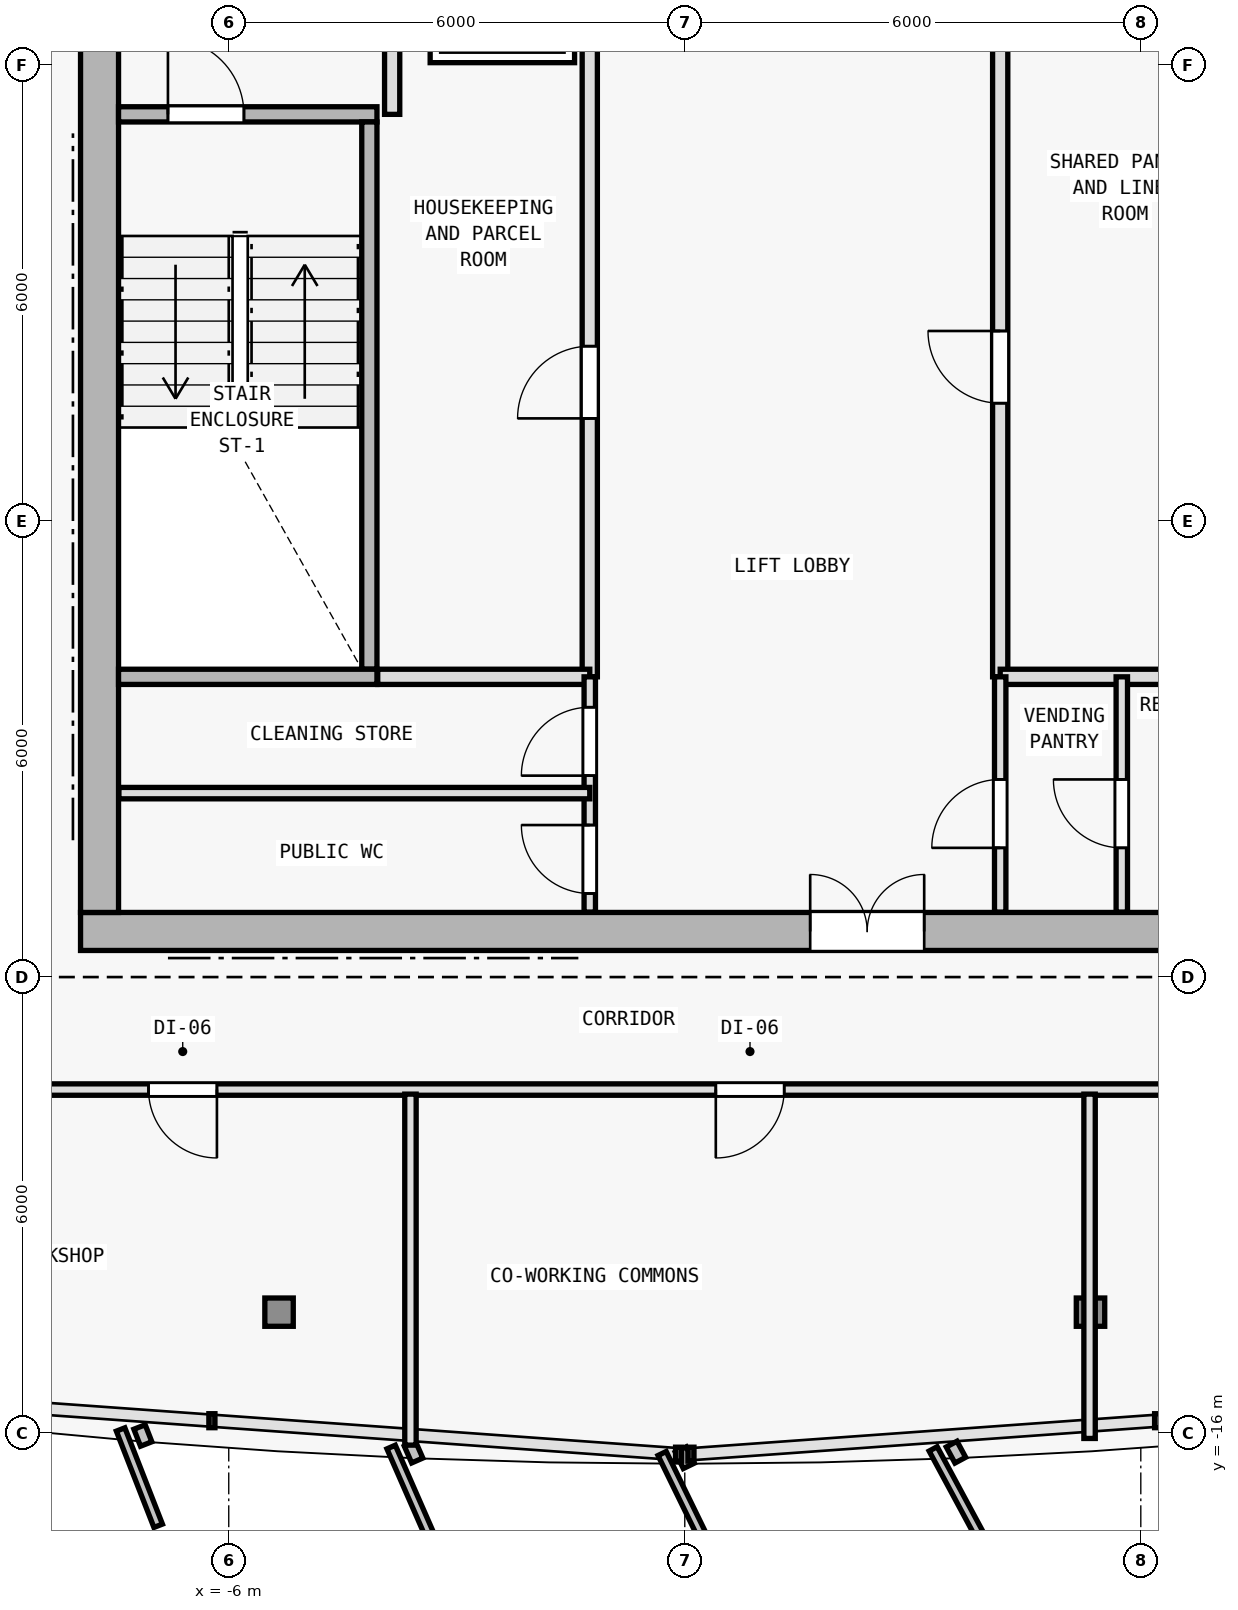
"""IFC4 building model, lengths in metres.
Left out: names, types, materials, properties, quantities, classifications, styles, units other than length and angle.
Written with IfcOpenShell. Run it as: python <this file> out.ifc"""

import sys

from ifc_helpers import new_model, si_unit, direction, frame, frame_2d, origin, origin_2d, place, context, subcontext, project, spatial, rectangle, i_section, extrude, element, fill, save


model = new_model("IFC4")
c1 = context("Model", 3, precision=1e-05, world=origin(), true_north=direction((0.0, 1.0)))
c2 = subcontext(c1, "Body", "Model", "MODEL_VIEW")
j1 = project(units=[si_unit("LENGTHUNIT", "METRE"), si_unit("PLANEANGLEUNIT", "RADIAN")], contexts=[c1])
p1 = place(None, origin())
s1 = spatial("IfcSite", under=j1, at=p1, CompositionType="ELEMENT")
p2 = place(p1, origin())
s2 = spatial("IfcBuilding", under=s1, at=p2, CompositionType="ELEMENT")
p3 = place(p2, frame((0.0, 0.0, 250.8)))
s3 = spatial("IfcBuildingStorey", under=s2, at=p3, CompositionType="ELEMENT", Elevation=250.8)
for number, where, z_axis, x_axis in (
    (1, (-7.7, -9.4, 0.0), (0.0, 0.0, 1.0), (1.0, 0.0, 0.0)),
    (2, (0.0, -9.4, 0.0), (0.0, 0.0, 1.0), (1.0, 0.0, 0.0)),
    (3, (-7.7, 2.0, 0.0), (0.0, 0.0, 1.0), (1.0, 0.0, 0.0)),
):
    element("IfcColumn", number, at=place(p3, frame(where, z_axis=z_axis, x_axis=x_axis)), inside=s3, PredefinedType="COLUMN", context=c2, shape_type="SweptSolid", body=[
        extrude(i_section(OverallWidth=0.374, OverallDepth=0.372, WebThickness=0.012, FlangeThickness=0.02, FilletRadius=0.015, at=origin_2d()), origin(), (0.0, 0.0, 1.0), 3.6),
    ])
for number, where, z_axis, x_axis in (
    (4, (-5.338, -14.408, 0.005), (0.007, 0.035, 0.999), (-0.982, 0.191, 0.0)),
    (5, (5.338, -14.408, 0.005), (-0.007, 0.035, 0.999), (-0.982, -0.191, 0.0)),
):
    element("IfcColumn", number, at=place(p3, frame(where, z_axis=z_axis, x_axis=x_axis)), inside=s3, PredefinedType="COLUMN", context=c2, shape_type="SweptSolid", body=[
        extrude(i_section(OverallWidth=0.374, OverallDepth=0.372, WebThickness=0.012, FlangeThickness=0.02, FilletRadius=0.015, at=origin_2d()), origin(), (0.0, 0.0, 1.0), 3.592),
    ])
p4 = place(p3, frame((-7.95, -9.4, 0.0), z_axis=(0.0, 0.0, 1.0), x_axis=(1.0, 0.0, 0.0)))
e6 = element("IfcWall", 6, at=p4, inside=s3, PredefinedType="SHEAR", context=c2, shape_type="SweptSolid", body=[
    extrude(rectangle(XDim=15.9, YDim=0.5, at=frame_2d((7.95, 0.0))), origin(), (0.0, 0.0, 1.0), 3.35),
])
p5 = place(p4, frame((9.6, 0.0, 0.0)))
e7 = element("IfcOpeningElement", 7, at=p5, cuts=e6, PredefinedType="OPENING", context=c2, shape_type="SweptSolid", body=[
    extrude(rectangle(XDim=1.5, YDim=2.2, at=frame_2d((0.75, 1.1))), frame((0.0, 0.26, 0.0), z_axis=(0.0, -1.0, 0.0), x_axis=(1.0, 0.0, 0.0)), (0.0, 0.0, 1.0), 0.52),
])
p6 = place(p3, frame((-7.7, -9.15, 0.0), z_axis=(0.0, 0.0, 1.0), x_axis=(0.0, 1.0, 0.0)))
e8 = element("IfcWall", 8, at=p6, inside=s3, PredefinedType="SHEAR", context=c2, shape_type="SweptSolid", body=[
    extrude(rectangle(XDim=19.1, YDim=0.5, at=frame_2d((9.55, 0.0))), origin(), (0.0, 0.0, 1.0), 3.35),
])
p7 = place(p6, frame((12.7, 0.0, 0.0)))
e9 = element("IfcOpeningElement", 9, at=p7, cuts=e8, PredefinedType="OPENING", context=c2, shape_type="SweptSolid", body=[
    extrude(rectangle(XDim=1.1, YDim=2.15, at=frame_2d((0.55, 1.075))), frame((0.0, 0.26, 0.0), z_axis=(0.0, -1.0, 0.0), x_axis=(1.0, 0.0, 0.0)), (0.0, 0.0, 1.0), 0.52),
])
p8 = place(p3, frame((-7.45, 1.35, 0.0), z_axis=(0.0, 0.0, 1.0), x_axis=(1.0, 0.0, 0.0)))
e10 = element("IfcWall", 10, at=p8, inside=s3, PredefinedType="SOLIDWALL", context=c2, shape_type="SweptSolid", body=[
    extrude(rectangle(XDim=3.4, YDim=0.2, at=frame_2d((1.7, 0.0))), origin(), (0.0, 0.0, 1.0), 3.35),
])
p9 = place(p8, frame((0.65, 0.0, 0.0)))
e11 = element("IfcOpeningElement", 11, at=p9, cuts=e10, PredefinedType="OPENING", context=c2, shape_type="SweptSolid", body=[
    extrude(rectangle(XDim=1.0, YDim=2.15, at=frame_2d((0.5, 1.075))), frame((0.0, 0.11, 0.0), z_axis=(0.0, -1.0, 0.0), x_axis=(1.0, 0.0, 0.0)), (0.0, 0.0, 1.0), 0.22),
])
p10 = place(p3, frame((-4.15, -5.95, 0.0), z_axis=(0.0, 0.0, 1.0), x_axis=(0.0, 1.0, 0.0)))
e12 = element("IfcWall", 12, at=p10, inside=s3, PredefinedType="SOLIDWALL", context=c2, shape_type="SweptSolid", body=[
    extrude(rectangle(XDim=7.2, YDim=0.2, at=frame_2d((3.6, 0.0))), origin(), (0.0, 0.0, 1.0), 3.35),
])
p11 = place(p3, frame((-3.85, 1.35, 0.0), z_axis=(0.0, 0.0, 1.0), x_axis=(0.0, 1.0, 0.0)))
e13 = element("IfcWall", 13, at=p11, inside=s3, PredefinedType="SOLIDWALL", context=c2, shape_type="SweptSolid", body=[
    extrude(rectangle(XDim=8.595, YDim=0.2, at=frame_2d((4.297, 0.0))), origin(), (0.0, 0.0, 1.0), 3.35),
])
p12 = place(p11, frame((1.5, 0.0, 0.0)))
e14 = element("IfcOpeningElement", 14, at=p12, cuts=e13, PredefinedType="OPENING", context=c2, shape_type="SweptSolid", body=[
    extrude(rectangle(XDim=1.0, YDim=2.15, at=frame_2d((0.5, 1.075))), frame((0.0, 0.11, 0.0), z_axis=(0.0, -1.0, 0.0), x_axis=(1.0, 0.0, 0.0)), (0.0, 0.0, 1.0), 0.22),
])
p13 = place(p11, frame((3.18, 0.0, 0.0)))
e15 = element("IfcOpeningElement", 15, at=p13, cuts=e13, PredefinedType="OPENING", context=c2, shape_type="SweptSolid", body=[
    extrude(rectangle(XDim=1.0, YDim=2.15, at=frame_2d((0.5, 1.075))), frame((0.0, 0.11, 0.0), z_axis=(0.0, -1.0, 0.0), x_axis=(1.0, 0.0, 0.0)), (0.0, 0.0, 1.0), 0.22),
])
p14 = place(p3, frame((4.15, -6.05, 0.0), z_axis=(0.0, 0.0, 1.0), x_axis=(0.0, 1.0, 0.0)))
e16 = element("IfcWall", 16, at=p14, inside=s3, PredefinedType="SOLIDWALL", context=c2, shape_type="SweptSolid", body=[
    extrude(rectangle(XDim=8.7, YDim=0.2, at=frame_2d((4.35, 0.0))), origin(), (0.0, 0.0, 1.0), 3.35),
])
p15 = place(p14, frame((3.6, 0.0, 0.0)))
e17 = element("IfcOpeningElement", 17, at=p15, cuts=e16, PredefinedType="OPENING", context=c2, shape_type="SweptSolid", body=[
    extrude(rectangle(XDim=0.95, YDim=2.1, at=frame_2d((0.475, 1.05))), frame((0.0, 0.11, 0.0), z_axis=(0.0, -1.0, 0.0), x_axis=(1.0, 0.0, 0.0)), (0.0, 0.0, 1.0), 0.22),
])
p16 = place(p3, frame((-1.25, -6.05, 0.0), z_axis=(0.0, 0.0, 1.0), x_axis=(0.0, 1.0, 0.0)))
e18 = element("IfcWall", 18, at=p16, inside=s3, PredefinedType="SOLIDWALL", context=c2, shape_type="SweptSolid", body=[
    extrude(rectangle(XDim=8.7, YDim=0.2, at=frame_2d((4.35, 0.0))), origin(), (0.0, 0.0, 1.0), 3.35),
])
p17 = place(p16, frame((3.4, 0.0, 0.0)))
e19 = element("IfcOpeningElement", 19, at=p17, cuts=e18, PredefinedType="OPENING", context=c2, shape_type="SweptSolid", body=[
    extrude(rectangle(XDim=0.95, YDim=2.1, at=frame_2d((0.475, 1.05))), frame((0.0, 0.11, 0.0), z_axis=(0.0, -1.0, 0.0), x_axis=(1.0, 0.0, 0.0)), (0.0, 0.0, 1.0), 0.22),
])
p18 = place(p3, frame((-7.45, -6.05, 0.0), z_axis=(0.0, 0.0, 1.0), x_axis=(1.0, 0.0, 0.0)))
e20 = element("IfcWall", 20, at=p18, inside=s3, PredefinedType="SOLIDWALL", context=c2, shape_type="SweptSolid", body=[
    extrude(rectangle(XDim=3.4, YDim=0.2, at=frame_2d((1.7, 0.0))), origin(), (0.0, 0.0, 1.0), 3.35),
])
p19 = place(p3, frame((-4.04, -6.05, 0.0), z_axis=(0.0, 0.0, 1.0), x_axis=(1.0, 0.0, 0.0)))
e21 = element("IfcWall", 21, at=p19, inside=s3, PredefinedType="SOLIDWALL", context=c2, shape_type="SweptSolid", body=[
    extrude(rectangle(XDim=2.79, YDim=0.2, at=frame_2d((1.395, 0.0))), origin(), (0.0, 0.0, 1.0), 3.35),
])
p20 = place(p3, frame((4.15, -6.05, 0.0), z_axis=(0.0, 0.0, 1.0), x_axis=(1.0, 0.0, 0.0)))
e22 = element("IfcWall", 22, at=p20, inside=s3, PredefinedType="SOLIDWALL", context=c2, shape_type="SweptSolid", body=[
    extrude(rectangle(XDim=3.295, YDim=0.2, at=frame_2d((1.647, 0.0))), origin(), (0.0, 0.0, 1.0), 3.35),
])
p21 = place(p3, frame((-1.25, -9.145, 0.0), z_axis=(0.0, 0.0, 1.0), x_axis=(0.0, 1.0, 0.0)))
e23 = element("IfcWall", 23, at=p21, inside=s3, PredefinedType="PARTITIONING", context=c2, shape_type="SweptSolid", body=[
    extrude(rectangle(XDim=3.095, YDim=0.15, at=frame_2d((1.547, 0.0))), origin(), (0.0, 0.0, 1.0), 3.35),
])
p22 = place(p21, frame((1.795, 0.0, 0.0)))
e24 = element("IfcOpeningElement", 24, at=p22, cuts=e23, PredefinedType="OPENING", context=c2, shape_type="SweptSolid", body=[
    extrude(rectangle(XDim=0.9, YDim=2.1, at=frame_2d((0.45, 1.05))), frame((0.0, 0.085, 0.0), z_axis=(0.0, -1.0, 0.0), x_axis=(1.0, 0.0, 0.0)), (0.0, 0.0, 1.0), 0.17),
])
p23 = place(p21, frame((0.245, 0.0, 0.0)))
e25 = element("IfcOpeningElement", 25, at=p23, cuts=e23, PredefinedType="OPENING", context=c2, shape_type="SweptSolid", body=[
    extrude(rectangle(XDim=0.9, YDim=2.1, at=frame_2d((0.45, 1.05))), frame((0.0, 0.085, 0.0), z_axis=(0.0, -1.0, 0.0), x_axis=(1.0, 0.0, 0.0)), (0.0, 0.0, 1.0), 0.17),
])
p24 = place(p3, frame((4.15, -9.145, 0.0), z_axis=(0.0, 0.0, 1.0), x_axis=(0.0, 1.0, 0.0)))
e26 = element("IfcWall", 26, at=p24, inside=s3, PredefinedType="PARTITIONING", context=c2, shape_type="SweptSolid", body=[
    extrude(rectangle(XDim=3.095, YDim=0.15, at=frame_2d((1.547, 0.0))), origin(), (0.0, 0.0, 1.0), 3.35),
])
p25 = place(p24, frame((0.845, 0.0, 0.0)))
e27 = element("IfcOpeningElement", 27, at=p25, cuts=e26, PredefinedType="OPENING", context=c2, shape_type="SweptSolid", body=[
    extrude(rectangle(XDim=0.9, YDim=2.1, at=frame_2d((0.45, 1.05))), frame((0.0, 0.085, 0.0), z_axis=(0.0, -1.0, 0.0), x_axis=(1.0, 0.0, 0.0)), (0.0, 0.0, 1.0), 0.17),
])
p26 = place(p3, frame((-7.445, -7.58, 0.0), z_axis=(0.0, 0.0, 1.0), x_axis=(1.0, 0.0, 0.0)))
e28 = element("IfcWall", 28, at=p26, inside=s3, PredefinedType="PARTITIONING", context=c2, shape_type="SweptSolid", body=[
    extrude(rectangle(XDim=6.195, YDim=0.15, at=frame_2d((3.098, 0.0))), origin(), (0.0, 0.0, 1.0), 3.35),
])
p27 = place(p3, frame((5.75, -9.145, 0.0), z_axis=(0.0, 0.0, 1.0), x_axis=(0.0, 1.0, 0.0)))
e29 = element("IfcWall", 29, at=p27, inside=s3, PredefinedType="PARTITIONING", context=c2, shape_type="SweptSolid", body=[
    extrude(rectangle(XDim=3.095, YDim=0.15, at=frame_2d((1.547, 0.0))), origin(), (0.0, 0.0, 1.0), 3.35),
])
p28 = place(p27, frame((0.845, 0.0, 0.0)))
e30 = element("IfcOpeningElement", 30, at=p28, cuts=e29, PredefinedType="OPENING", context=c2, shape_type="SweptSolid", body=[
    extrude(rectangle(XDim=0.9, YDim=2.1, at=frame_2d((0.45, 1.05))), frame((0.0, 0.085, 0.0), z_axis=(0.0, -1.0, 0.0), x_axis=(1.0, 0.0, 0.0)), (0.0, 0.0, 1.0), 0.17),
])
p29 = place(p3, frame((9.78, -11.48, 0.0), z_axis=(0.0, 0.0, 1.0), x_axis=(-1.0, 0.0, 0.0)))
e31 = element("IfcWall", 31, at=p29, inside=s3, PredefinedType="PARTITIONING", context=c2, shape_type="SweptSolid", body=[
    extrude(rectangle(XDim=19.56, YDim=0.15, at=frame_2d((9.78, 0.0))), origin(), (0.0, 0.0, 1.0), 3.025),
])
p30 = place(p29, frame((15.936, 0.0, 0.0)))
e32 = element("IfcOpeningElement", 32, at=p30, cuts=e31, PredefinedType="OPENING", context=c2, shape_type="SweptSolid", body=[
    extrude(rectangle(XDim=0.9, YDim=2.1, at=frame_2d((0.45, 1.05))), frame((0.0, 0.085, 0.0), z_axis=(0.0, -1.0, 0.0), x_axis=(1.0, 0.0, 0.0)), (0.0, 0.0, 1.0), 0.17),
])
p31 = place(p29, frame((8.472, 0.0, 0.0)))
e33 = element("IfcOpeningElement", 33, at=p31, cuts=e31, PredefinedType="OPENING", context=c2, shape_type="SweptSolid", body=[
    extrude(rectangle(XDim=0.9, YDim=2.1, at=frame_2d((0.45, 1.05))), frame((0.0, 0.085, 0.0), z_axis=(0.0, -1.0, 0.0), x_axis=(1.0, 0.0, 0.0)), (0.0, 0.0, 1.0), 0.17),
])
p32 = place(p29, frame((1.866, 0.0, 0.0)))
e34 = element("IfcOpeningElement", 34, at=p32, cuts=e31, PredefinedType="OPENING", context=c2, shape_type="SweptSolid", body=[
    extrude(rectangle(XDim=0.9, YDim=2.1, at=frame_2d((0.45, 1.05))), frame((0.0, 0.085, 0.0), z_axis=(0.0, -1.0, 0.0), x_axis=(1.0, 0.0, 0.0)), (0.0, 0.0, 1.0), 0.17),
])
p33 = place(p3, frame((5.326, -11.54, 0.0), z_axis=(0.0, 0.0, 1.0), x_axis=(0.0, -1.0, 0.0)))
e35 = element("IfcWall", 35, at=p33, inside=s3, PredefinedType="PARTITIONING", context=c2, shape_type="SweptSolid", body=[
    extrude(rectangle(XDim=4.53, YDim=0.15, at=frame_2d((2.265, 0.0))), origin(), (0.0, 0.0, 1.0), 3.015),
])
p34 = place(p3, frame((-3.609, -11.54, 0.0), z_axis=(0.0, 0.0, 1.0), x_axis=(0.0, -1.0, 0.0)))
e36 = element("IfcWall", 36, at=p34, inside=s3, PredefinedType="PARTITIONING", context=c2, shape_type="SweptSolid", body=[
    extrude(rectangle(XDim=4.618, YDim=0.15, at=frame_2d((2.309, 0.0))), origin(), (0.0, 0.0, 1.0), 2.925),
])
p35 = place(p5, origin())
e37 = element("IfcDoor", 37, at=p35, inside=s3, OperationType="DOUBLE_DOOR_SINGLE_SWING", PredefinedType="DOOR", context=c2, shape_type="SweptSolid", body=[
    extrude(rectangle(XDim=1.5, YDim=2.2, at=frame_2d((0.75, 1.1))), frame((0.0, 0.025, 0.0), z_axis=(0.0, -1.0, 0.0), x_axis=(1.0, 0.0, 0.0)), (0.0, 0.0, 1.0), 0.05),
])
fill(e7, e37)
p36 = place(p9, origin())
e38 = element("IfcDoor", 38, at=p36, inside=s3, OperationType="SINGLE_SWING_LEFT", PredefinedType="DOOR", context=c2, shape_type="SweptSolid", body=[
    extrude(rectangle(XDim=1.0, YDim=2.15, at=frame_2d((0.5, 1.075))), frame((0.0, 0.025, 0.0), z_axis=(0.0, -1.0, 0.0), x_axis=(1.0, 0.0, 0.0)), (0.0, 0.0, 1.0), 0.05),
])
fill(e11, e38)
p37 = place(p15, origin())
e39 = element("IfcDoor", 39, at=p37, inside=s3, OperationType="SINGLE_SWING_RIGHT", PredefinedType="DOOR", context=c2, shape_type="SweptSolid", body=[
    extrude(rectangle(XDim=0.95, YDim=2.1, at=frame_2d((0.475, 1.05))), frame((0.0, 0.025, 0.0), z_axis=(0.0, -1.0, 0.0), x_axis=(1.0, 0.0, 0.0)), (0.0, 0.0, 1.0), 0.05),
])
fill(e17, e39)
p38 = place(p17, origin())
e40 = element("IfcDoor", 40, at=p38, inside=s3, OperationType="SINGLE_SWING_LEFT", PredefinedType="DOOR", context=c2, shape_type="SweptSolid", body=[
    extrude(rectangle(XDim=0.95, YDim=2.1, at=frame_2d((0.475, 1.05))), frame((0.0, 0.025, 0.0), z_axis=(0.0, -1.0, 0.0), x_axis=(1.0, 0.0, 0.0)), (0.0, 0.0, 1.0), 0.05),
])
fill(e19, e40)
p39 = place(p22, origin())
e41 = element("IfcDoor", 41, at=p39, inside=s3, OperationType="SINGLE_SWING_LEFT", PredefinedType="DOOR", context=c2, shape_type="SweptSolid", body=[
    extrude(rectangle(XDim=0.9, YDim=2.1, at=frame_2d((0.45, 1.05))), frame((0.0, 0.025, 0.0), z_axis=(0.0, -1.0, 0.0), x_axis=(1.0, 0.0, 0.0)), (0.0, 0.0, 1.0), 0.05),
])
fill(e24, e41)
p40 = place(p23, origin())
e42 = element("IfcDoor", 42, at=p40, inside=s3, OperationType="SINGLE_SWING_RIGHT", PredefinedType="DOOR", context=c2, shape_type="SweptSolid", body=[
    extrude(rectangle(XDim=0.9, YDim=2.1, at=frame_2d((0.45, 1.05))), frame((0.0, 0.025, 0.0), z_axis=(0.0, -1.0, 0.0), x_axis=(1.0, 0.0, 0.0)), (0.0, 0.0, 1.0), 0.05),
])
fill(e25, e42)
p41 = place(p25, origin())
e43 = element("IfcDoor", 43, at=p41, inside=s3, OperationType="SINGLE_SWING_LEFT", PredefinedType="DOOR", context=c2, shape_type="SweptSolid", body=[
    extrude(rectangle(XDim=0.9, YDim=2.1, at=frame_2d((0.45, 1.05))), frame((0.0, 0.025, 0.0), z_axis=(0.0, -1.0, 0.0), x_axis=(1.0, 0.0, 0.0)), (0.0, 0.0, 1.0), 0.05),
])
fill(e27, e43)
p42 = place(p28, origin())
e44 = element("IfcDoor", 44, at=p42, inside=s3, OperationType="SINGLE_SWING_RIGHT", PredefinedType="DOOR", context=c2, shape_type="SweptSolid", body=[
    extrude(rectangle(XDim=0.9, YDim=2.1, at=frame_2d((0.45, 1.05))), frame((0.0, 0.025, 0.0), z_axis=(0.0, -1.0, 0.0), x_axis=(1.0, 0.0, 0.0)), (0.0, 0.0, 1.0), 0.05),
])
fill(e30, e44)
p43 = place(p30, origin())
e45 = element("IfcDoor", 45, at=p43, inside=s3, OperationType="SINGLE_SWING_LEFT", PredefinedType="DOOR", context=c2, shape_type="SweptSolid", body=[
    extrude(rectangle(XDim=0.9, YDim=2.1, at=frame_2d((0.45, 1.05))), frame((0.0, 0.025, 0.0), z_axis=(0.0, -1.0, 0.0), x_axis=(1.0, 0.0, 0.0)), (0.0, 0.0, 1.0), 0.05),
])
fill(e32, e45)
p44 = place(p31, origin())
e46 = element("IfcDoor", 46, at=p44, inside=s3, OperationType="SINGLE_SWING_RIGHT", PredefinedType="DOOR", context=c2, shape_type="SweptSolid", body=[
    extrude(rectangle(XDim=0.9, YDim=2.1, at=frame_2d((0.45, 1.05))), frame((0.0, 0.025, 0.0), z_axis=(0.0, -1.0, 0.0), x_axis=(1.0, 0.0, 0.0)), (0.0, 0.0, 1.0), 0.05),
])
fill(e33, e46)
save(model, sys.argv[1])
